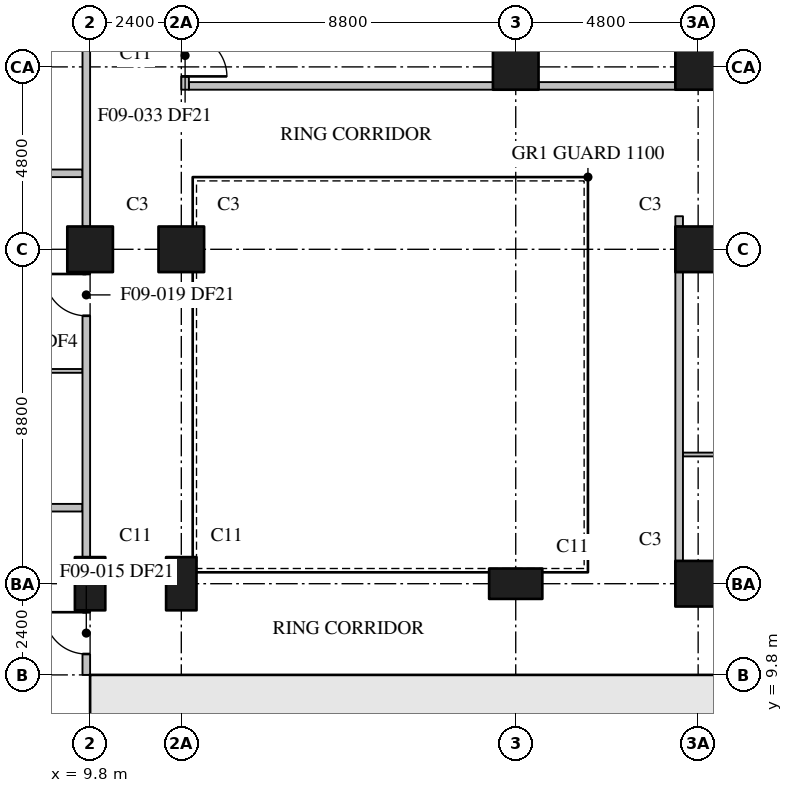
"""IFC4 building model, lengths in metres.
Left out: names, types, materials, properties, quantities, classifications, styles, units other than length and angle.
Written with IfcOpenShell. Run it as: python <this file> out.ifc"""

import sys

from ifc_helpers import new_model, si_unit, direction, frame, frame_2d, origin, origin_2d, place, context, subcontext, project, spatial, rectangle, extrude, element, fill, save


model = new_model("IFC4")
c1 = context("Model", 3, precision=1e-05, world=origin(), true_north=direction((0.0, 1.0)))
c2 = subcontext(c1, "Body", "Model", "MODEL_VIEW")
j1 = project(units=[si_unit("LENGTHUNIT", "METRE"), si_unit("PLANEANGLEUNIT", "RADIAN")], contexts=[c1])
p1 = place(None, origin())
s1 = spatial("IfcSite", under=j1, at=p1, CompositionType="ELEMENT")
p2 = place(p1, origin())
s2 = spatial("IfcBuilding", under=s1, at=p2, CompositionType="ELEMENT")
p3 = place(p2, frame((0.0, 0.0, 98.2)))
s3 = spatial("IfcBuildingStorey", under=s2, at=p3, CompositionType="ELEMENT", Elevation=98.2)
p4 = place(p3, frame((9.8, 12.2, 0.0), z_axis=(0.0, 0.0, 1.0), x_axis=(0.0, 1.0, 0.0)))
e1 = element("IfcColumn", 1, at=p4, inside=s3, PredefinedType="COLUMN", context=c2, shape_type="SweptSolid", body=[
    extrude(rectangle(XDim=1.4, YDim=0.8, at=origin_2d()), origin(), (0.0, 0.0, 1.0), 3.7),
])
p5 = place(p3, frame((9.8, 21.0, 0.0), z_axis=(0.0, 0.0, 1.0), x_axis=(1.0, 0.0, 0.0)))
e2 = element("IfcColumn", 2, at=p5, inside=s3, PredefinedType="COLUMN", context=c2, shape_type="SweptSolid", body=[
    extrude(rectangle(XDim=1.2, YDim=1.2, at=origin_2d()), origin(), (0.0, 0.0, 1.0), 3.7),
])
p6 = place(p3, frame((12.2, 12.2, 0.0), z_axis=(0.0, 0.0, 1.0), x_axis=(0.0, 1.0, 0.0)))
e3 = element("IfcColumn", 3, at=p6, inside=s3, PredefinedType="COLUMN", context=c2, shape_type="SweptSolid", body=[
    extrude(rectangle(XDim=1.4, YDim=0.8, at=origin_2d()), origin(), (0.0, 0.0, 1.0), 3.7),
])
p7 = place(p3, frame((12.2, 21.0, 0.0), z_axis=(0.0, 0.0, 1.0), x_axis=(1.0, 0.0, 0.0)))
e4 = element("IfcColumn", 4, at=p7, inside=s3, PredefinedType="COLUMN", context=c2, shape_type="SweptSolid", body=[
    extrude(rectangle(XDim=1.2, YDim=1.2, at=origin_2d()), origin(), (0.0, 0.0, 1.0), 3.7),
])
p8 = place(p3, frame((21.0, 12.2, 0.0), z_axis=(0.0, 0.0, 1.0), x_axis=(1.0, 0.0, 0.0)))
e5 = element("IfcColumn", 5, at=p8, inside=s3, PredefinedType="COLUMN", context=c2, shape_type="SweptSolid", body=[
    extrude(rectangle(XDim=1.4, YDim=0.8, at=origin_2d()), origin(), (0.0, 0.0, 1.0), 3.7),
])
for number, where, z_axis, x_axis in (
    (6, (21.0, 25.8, 0.0), (0.0, 0.0, 1.0), (1.0, 0.0, 0.0)),
    (7, (25.8, 12.2, 0.0), (0.0, 0.0, 1.0), (1.0, 0.0, 0.0)),
    (8, (25.8, 21.0, 0.0), (0.0, 0.0, 1.0), (1.0, 0.0, 0.0)),
    (9, (25.8, 25.8, 0.0), (0.0, 0.0, 1.0), (1.0, 0.0, 0.0)),
):
    element("IfcColumn", number, at=place(p3, frame(where, z_axis=z_axis, x_axis=x_axis)), inside=s3, PredefinedType="COLUMN", context=c2, shape_type="SweptSolid", body=[
        extrude(rectangle(XDim=1.2, YDim=1.2, at=origin_2d()), origin(), (0.0, 0.0, 1.0), 3.7),
    ])
p9 = place(p3, frame((10.6, 1.2, 0.0), z_axis=(0.0, 0.0, 1.0), x_axis=(0.0, 1.0, 0.0)))
e10 = element("IfcWall", 10, at=p9, inside=s3, PredefinedType="SHEAR", context=c2, shape_type="SweptSolid", body=[
    extrude(rectangle(XDim=8.6, YDim=0.8, at=frame_2d((4.3, 0.0))), origin(), (0.0, 0.0, 1.0), 3.7),
])
p10 = place(p3, frame((9.8, 9.6, 0.0), z_axis=(0.0, 0.0, 1.0), x_axis=(1.0, 0.0, 0.0)))
e11 = element("IfcWall", 11, at=p10, inside=s3, PredefinedType="SHEAR", context=c2, shape_type="SweptSolid", body=[
    extrude(rectangle(XDim=4.3, YDim=0.4, at=frame_2d((2.15, 0.0))), origin(), (0.0, 0.0, 1.0), 3.7),
])
p11 = place(p10, frame((2.05, 0.0, 0.0)))
e12 = element("IfcOpeningElement", 12, at=p11, cuts=e11, PredefinedType="OPENING", context=c2, shape_type="SweptSolid", body=[
    extrude(rectangle(XDim=1.2, YDim=2.1, at=frame_2d((0.6, 1.05))), frame((0.0, 0.21, 0.0), z_axis=(0.0, -1.0, 0.0), x_axis=(1.0, 0.0, 0.0)), (0.0, 0.0, 1.0), 0.42),
])
p12 = place(p3, frame((14.1, 9.6, 0.0), z_axis=(0.0, 0.0, 1.0), x_axis=(1.0, 0.0, 0.0)))
e13 = element("IfcWall", 13, at=p12, inside=s3, PredefinedType="SHEAR", context=c2, shape_type="SweptSolid", body=[
    extrude(rectangle(XDim=10.4, YDim=0.4, at=frame_2d((5.2, 0.0))), origin(), (0.0, 0.0, 1.0), 3.7),
])
p13 = place(p3, frame((14.1, 1.2, 0.0), z_axis=(0.0, 0.0, 1.0), x_axis=(0.0, 1.0, 0.0)))
e14 = element("IfcWall", 14, at=p13, inside=s3, PredefinedType="SHEAR", context=c2, shape_type="SweptSolid", body=[
    extrude(rectangle(XDim=8.4, YDim=0.4, at=frame_2d((4.2, 0.0))), origin(), (0.0, 0.0, 1.0), 3.7),
])
p14 = place(p13, frame((4.45, 0.0, 0.0)))
e15 = element("IfcOpeningElement", 15, at=p14, cuts=e14, PredefinedType="OPENING", context=c2, shape_type="SweptSolid", body=[
    extrude(rectangle(XDim=0.9, YDim=2.1, at=frame_2d((0.45, 1.05))), frame((0.0, 0.21, 0.0), z_axis=(0.0, -1.0, 0.0), x_axis=(1.0, 0.0, 0.0)), (0.0, 0.0, 1.0), 0.42),
])
for number, where, z_axis, x_axis in (
    (16, (16.7, 7.0, 0.0), (0.0, 0.0, 1.0), (0.0, 1.0, 0.0)),
    (17, (19.3, 7.0, 0.0), (0.0, 0.0, 1.0), (0.0, 1.0, 0.0)),
    (18, (21.9, 7.0, 0.0), (0.0, 0.0, 1.0), (0.0, 1.0, 0.0)),
    (19, (24.5, 7.0, 0.0), (0.0, 0.0, 1.0), (0.0, 1.0, 0.0)),
):
    element("IfcWall", number, at=place(p3, frame(where, z_axis=z_axis, x_axis=x_axis)), inside=s3, PredefinedType="SHEAR", context=c2, shape_type="SweptSolid", body=[
        extrude(rectangle(XDim=2.4, YDim=0.25, at=frame_2d((1.2, 0.0))), origin(), (0.0, 0.0, 1.0), 3.7),
    ])
p15 = place(p3, frame((25.3, 12.8, 0.0), z_axis=(0.0, 0.0, 1.0), x_axis=(0.0, 1.0, 0.0)))
e20 = element("IfcWall", 20, at=p15, inside=s3, PredefinedType="PARTITIONING", context=c2, shape_type="SweptSolid", body=[
    extrude(rectangle(XDim=7.6, YDim=0.2, at=frame_2d((3.8, 0.0))), origin(), (0.0, 0.0, 1.0), 3.3),
])
p16 = place(p3, frame((25.3, 21.6, 0.0), z_axis=(0.0, 0.0, 1.0), x_axis=(0.0, 1.0, 0.0)))
e21 = element("IfcWall", 21, at=p16, inside=s3, PredefinedType="PARTITIONING", context=c2, shape_type="SweptSolid", body=[
    extrude(rectangle(XDim=0.27, YDim=0.2, at=frame_2d((0.135, 0.0))), origin(), (0.0, 0.0, 1.0), 3.3),
])
p17 = place(p3, frame((9.7, 9.8, 0.0), z_axis=(0.0, 0.0, 1.0), x_axis=(0.0, 1.0, 0.0)))
e22 = element("IfcWall", 22, at=p17, inside=s3, PredefinedType="PARTITIONING", context=c2, shape_type="SweptSolid", body=[
    extrude(rectangle(XDim=1.7, YDim=0.2, at=frame_2d((0.85, 0.0))), origin(), (0.0, 0.0, 1.0), 3.3),
])
p18 = place(p17, frame((0.55, 0.0, 0.0)))
e23 = element("IfcOpeningElement", 23, at=p18, cuts=e22, PredefinedType="OPENING", context=c2, shape_type="SweptSolid", body=[
    extrude(rectangle(XDim=1.1, YDim=2.1, at=frame_2d((0.55, 1.05))), frame((0.0, 0.11, 0.0), z_axis=(0.0, -1.0, 0.0), x_axis=(1.0, 0.0, 0.0)), (0.0, 0.0, 1.0), 0.22),
])
p19 = place(p3, frame((9.7, 12.9, 0.0), z_axis=(0.0, 0.0, 1.0), x_axis=(0.0, 1.0, 0.0)))
e24 = element("IfcWall", 24, at=p19, inside=s3, PredefinedType="PARTITIONING", context=c2, shape_type="SweptSolid", body=[
    extrude(rectangle(XDim=7.5, YDim=0.2, at=frame_2d((3.75, 0.0))), origin(), (0.0, 0.0, 1.0), 3.3),
])
p20 = place(p19, frame((6.35, 0.0, 0.0)))
e25 = element("IfcOpeningElement", 25, at=p20, cuts=e24, PredefinedType="OPENING", context=c2, shape_type="SweptSolid", body=[
    extrude(rectangle(XDim=1.1, YDim=2.1, at=frame_2d((0.55, 1.05))), frame((0.0, 0.11, 0.0), z_axis=(0.0, -1.0, 0.0), x_axis=(1.0, 0.0, 0.0)), (0.0, 0.0, 1.0), 0.22),
])
p21 = place(p3, frame((9.7, 21.6, 0.0), z_axis=(0.0, 0.0, 1.0), x_axis=(0.0, 1.0, 0.0)))
e26 = element("IfcWall", 26, at=p21, inside=s3, PredefinedType="PARTITIONING", context=c2, shape_type="SweptSolid", body=[
    extrude(rectangle(XDim=5.1, YDim=0.2, at=frame_2d((2.55, 0.0))), origin(), (0.0, 0.0, 1.0), 3.3),
])
for number, where, z_axis, x_axis in (
    (27, (0.31, 14.2, 0.0), (0.0, 0.0, 1.0), (1.0, 0.0, 0.0)),
    (28, (0.31, 23.0, 0.0), (0.0, 0.0, 1.0), (1.0, 0.0, 0.0)),
):
    element("IfcWall", number, at=place(p3, frame(where, z_axis=z_axis, x_axis=x_axis)), inside=s3, PredefinedType="PARTITIONING", context=c2, shape_type="SweptSolid", body=[
        extrude(rectangle(XDim=9.29, YDim=0.2, at=frame_2d((4.645, 0.0))), origin(), (0.0, 0.0, 1.0), 3.3),
    ])
p22 = place(p3, frame((12.3, 26.7, 0.0), z_axis=(0.0, 0.0, 1.0), x_axis=(0.0, -1.0, 0.0)))
e29 = element("IfcWall", 29, at=p22, inside=s3, PredefinedType="PARTITIONING", context=c2, shape_type="SweptSolid", body=[
    extrude(rectangle(XDim=1.5, YDim=0.2, at=frame_2d((0.75, 0.0))), origin(), (0.0, 0.0, 1.0), 3.3),
])
p23 = place(p22, frame((0.05, 0.0, 0.0)))
e30 = element("IfcOpeningElement", 30, at=p23, cuts=e29, PredefinedType="OPENING", context=c2, shape_type="SweptSolid", body=[
    extrude(rectangle(XDim=1.1, YDim=2.1, at=frame_2d((0.55, 1.05))), frame((0.0, 0.11, 0.0), z_axis=(0.0, -1.0, 0.0), x_axis=(1.0, 0.0, 0.0)), (0.0, 0.0, 1.0), 0.22),
])
p24 = place(p3, frame((12.4, 25.3, 0.0), z_axis=(0.0, 0.0, 1.0), x_axis=(1.0, 0.0, 0.0)))
e31 = element("IfcWall", 31, at=p24, inside=s3, PredefinedType="PARTITIONING", context=c2, shape_type="SweptSolid", body=[
    extrude(rectangle(XDim=8.0, YDim=0.2, at=frame_2d((4.0, 0.0))), origin(), (0.0, 0.0, 1.0), 3.3),
])
p25 = place(p3, frame((21.6, 25.3, 0.0), z_axis=(0.0, 0.0, 1.0), x_axis=(1.0, 0.0, 0.0)))
e32 = element("IfcWall", 32, at=p25, inside=s3, PredefinedType="PARTITIONING", context=c2, shape_type="SweptSolid", body=[
    extrude(rectangle(XDim=3.6, YDim=0.2, at=frame_2d((1.8, 0.0))), origin(), (0.0, 0.0, 1.0), 3.3),
])
p26 = place(p3, frame((25.4, 15.6, 0.0), z_axis=(0.0, 0.0, 1.0), x_axis=(1.0, 0.0, 0.0)))
e33 = element("IfcWall", 33, at=p26, inside=s3, PredefinedType="PARTITIONING", context=c2, shape_type="SweptSolid", body=[
    extrude(rectangle(XDim=2.75, YDim=0.1, at=frame_2d((1.375, 0.0))), origin(), (0.0, 0.0, 1.0), 3.3),
])
p27 = place(p3, frame((9.6, 17.8, 0.0), z_axis=(0.0, 0.0, 1.0), x_axis=(-1.0, 0.0, 0.0)))
e34 = element("IfcWall", 34, at=p27, inside=s3, PredefinedType="PARTITIONING", context=c2, shape_type="SweptSolid", body=[
    extrude(rectangle(XDim=3.15, YDim=0.1, at=frame_2d((1.575, 0.0))), origin(), (0.0, 0.0, 1.0), 3.3),
])
p28 = place(p27, frame((1.05, 0.0, 0.0)))
e35 = element("IfcOpeningElement", 35, at=p28, cuts=e34, PredefinedType="OPENING", context=c2, shape_type="SweptSolid", body=[
    extrude(rectangle(XDim=0.9, YDim=2.1, at=frame_2d((0.45, 1.05))), frame((0.0, 0.06, 0.0), z_axis=(0.0, -1.0, 0.0), x_axis=(1.0, 0.0, 0.0)), (0.0, 0.0, 1.0), 0.12),
])
p29 = place(p11, frame((1.2, 0.0, 0.0), z_axis=(0.0, 0.0, 1.0), x_axis=(-1.0, 0.0, 0.0)))
e36 = element("IfcDoor", 36, at=p29, inside=s3, OperationType="SINGLE_SWING_LEFT", PredefinedType="DOOR", context=c2, shape_type="SweptSolid", body=[
    extrude(rectangle(XDim=1.2, YDim=2.1, at=frame_2d((0.6, 1.05))), frame((0.0, 0.025, 0.0), z_axis=(0.0, -1.0, 0.0), x_axis=(1.0, 0.0, 0.0)), (0.0, 0.0, 1.0), 0.05),
])
fill(e12, e36)
p30 = place(p18, origin())
e37 = element("IfcDoor", 37, at=p30, inside=s3, OperationType="SINGLE_SWING_RIGHT", PredefinedType="DOOR", context=c2, shape_type="SweptSolid", body=[
    extrude(rectangle(XDim=1.1, YDim=2.1, at=frame_2d((0.55, 1.05))), frame((0.0, 0.025, 0.0), z_axis=(0.0, -1.0, 0.0), x_axis=(1.0, 0.0, 0.0)), (0.0, 0.0, 1.0), 0.05),
])
fill(e23, e37)
p31 = place(p20, origin())
e38 = element("IfcDoor", 38, at=p31, inside=s3, OperationType="SINGLE_SWING_RIGHT", PredefinedType="DOOR", context=c2, shape_type="SweptSolid", body=[
    extrude(rectangle(XDim=1.1, YDim=2.1, at=frame_2d((0.55, 1.05))), frame((0.0, 0.025, 0.0), z_axis=(0.0, -1.0, 0.0), x_axis=(1.0, 0.0, 0.0)), (0.0, 0.0, 1.0), 0.05),
])
fill(e25, e38)
p32 = place(p23, origin())
e39 = element("IfcDoor", 39, at=p32, inside=s3, OperationType="SINGLE_SWING_RIGHT", PredefinedType="DOOR", context=c2, shape_type="SweptSolid", body=[
    extrude(rectangle(XDim=1.1, YDim=2.1, at=frame_2d((0.55, 1.05))), frame((0.0, 0.025, 0.0), z_axis=(0.0, -1.0, 0.0), x_axis=(1.0, 0.0, 0.0)), (0.0, 0.0, 1.0), 0.05),
])
fill(e30, e39)
save(model, sys.argv[1])
